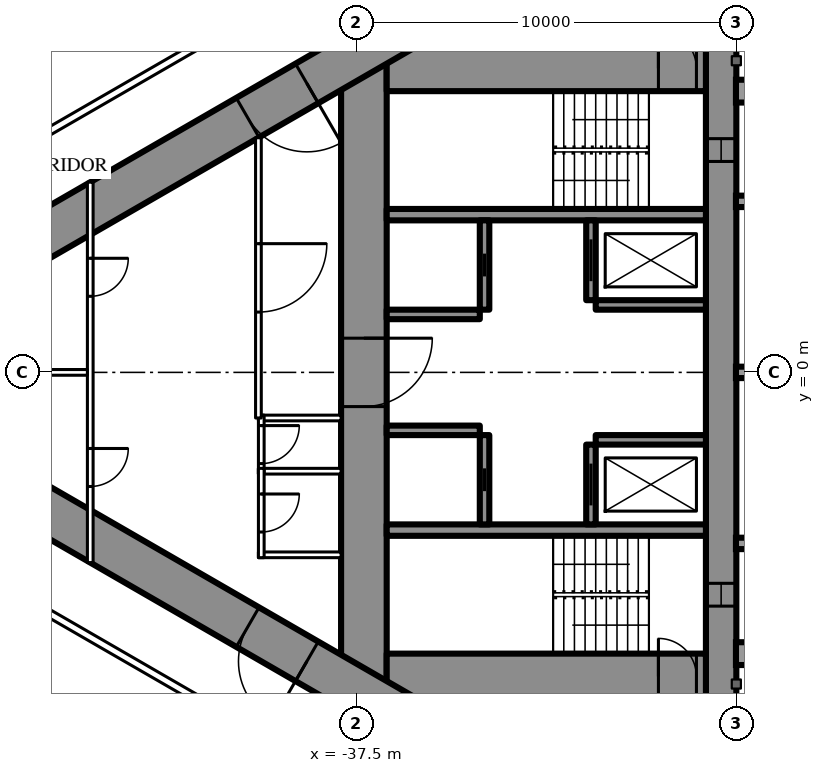
"""IFC4 building model, lengths in metres.
Left out: names, types, materials, properties, quantities, classifications, styles, units other than length and angle.
Written with IfcOpenShell. Run it as: python <this file> out.ifc"""

import sys

from ifc_helpers import new_model, si_unit, direction, frame, frame_2d, origin, place, context, subcontext, project, spatial, rectangle, extrude, element, fill, save


model = new_model("IFC4")
c1 = context("Model", 3, precision=1e-05, world=origin(), true_north=direction((0.0, 1.0)))
c2 = subcontext(c1, "Body", "Model", "MODEL_VIEW")
j1 = project(units=[si_unit("LENGTHUNIT", "METRE"), si_unit("PLANEANGLEUNIT", "RADIAN")], contexts=[c1])
p1 = place(None, origin())
s1 = spatial("IfcSite", under=j1, at=p1, CompositionType="ELEMENT")
p2 = place(p1, origin())
s2 = spatial("IfcBuilding", under=s1, at=p2, CompositionType="ELEMENT")
p3 = place(p2, frame((0.0, 0.0, 90.6)))
s3 = spatial("IfcBuildingStorey", under=s2, at=p3, CompositionType="ELEMENT", Elevation=90.6)
p4 = place(p3, frame((-27.9, 8.6, 0.0), z_axis=(0.0, 0.0, 1.0), x_axis=(0.0, -1.0, 0.0)))
e1 = element("IfcWall", 1, at=p4, inside=s3, PredefinedType="SHEAR", context=c2, shape_type="SweptSolid", body=[
    extrude(rectangle(XDim=17.2, YDim=0.8, at=frame_2d((8.6, 0.0))), origin(), (0.0, 0.0, 1.0), 3.5),
])
p5 = place(p4, frame((2.45, 0.0, 0.6)))
e2 = element("IfcOpeningElement", 2, at=p5, cuts=e1, PredefinedType="OPENING", context=c2, shape_type="SweptSolid", body=[
    extrude(rectangle(XDim=0.6, YDim=2.1, at=frame_2d((0.3, 1.05))), frame((0.0, 0.41, 0.0), z_axis=(0.0, -1.0, 0.0), x_axis=(1.0, 0.0, 0.0)), (0.0, 0.0, 1.0), 0.82),
])
p6 = place(p4, frame((14.15, 0.0, 0.6)))
e3 = element("IfcOpeningElement", 3, at=p6, cuts=e1, PredefinedType="OPENING", context=c2, shape_type="SweptSolid", body=[
    extrude(rectangle(XDim=0.6, YDim=2.1, at=frame_2d((0.3, 1.05))), frame((0.0, 0.41, 0.0), z_axis=(0.0, -1.0, 0.0), x_axis=(1.0, 0.0, 0.0)), (0.0, 0.0, 1.0), 0.82),
])
p7 = place(p3, frame((-37.3, 8.6, 0.0), z_axis=(0.0, 0.0, 1.0), x_axis=(0.0, -1.0, 0.0)))
e4 = element("IfcWall", 4, at=p7, inside=s3, PredefinedType="SHEAR", context=c2, shape_type="SweptSolid", body=[
    extrude(rectangle(XDim=17.2, YDim=1.2, at=frame_2d((8.6, 0.0))), origin(), (0.0, 0.0, 1.0), 3.5),
])
p8 = place(p7, frame((7.7, 0.0, 0.0)))
e5 = element("IfcOpeningElement", 5, at=p8, cuts=e4, PredefinedType="OPENING", context=c2, shape_type="SweptSolid", body=[
    extrude(rectangle(XDim=1.8, YDim=2.2, at=frame_2d((0.9, 1.1))), frame((0.0, 0.61, 0.0), z_axis=(0.0, -1.0, 0.0), x_axis=(1.0, 0.0, 0.0)), (0.0, 0.0, 1.0), 1.22),
])
p9 = place(p3, frame((-28.3, 8.0, 0.0), z_axis=(0.0, 0.0, 1.0), x_axis=(-1.0, 0.0, 0.0)))
e6 = element("IfcWall", 6, at=p9, inside=s3, PredefinedType="SHEAR", context=c2, shape_type="SweptSolid", body=[
    extrude(rectangle(XDim=8.4, YDim=1.2, at=frame_2d((4.2, 0.0))), origin(), (0.0, 0.0, 1.0), 3.5),
])
p10 = place(p9, frame((0.25, 0.0, 0.0)))
e7 = element("IfcOpeningElement", 7, at=p10, cuts=e6, PredefinedType="OPENING", context=c2, shape_type="SweptSolid", body=[
    extrude(rectangle(XDim=1.0, YDim=2.2, at=frame_2d((0.5, 1.1))), frame((0.0, 0.61, 0.0), z_axis=(0.0, -1.0, 0.0), x_axis=(1.0, 0.0, 0.0)), (0.0, 0.0, 1.0), 1.22),
])
p11 = place(p3, frame((-28.3, -8.0, 0.0), z_axis=(0.0, 0.0, 1.0), x_axis=(-1.0, 0.0, 0.0)))
e8 = element("IfcWall", 8, at=p11, inside=s3, PredefinedType="SHEAR", context=c2, shape_type="SweptSolid", body=[
    extrude(rectangle(XDim=8.4, YDim=1.2, at=frame_2d((4.2, 0.0))), origin(), (0.0, 0.0, 1.0), 3.5),
])
p12 = place(p11, frame((0.25, 0.0, 0.0)))
e9 = element("IfcOpeningElement", 9, at=p12, cuts=e8, PredefinedType="OPENING", context=c2, shape_type="SweptSolid", body=[
    extrude(rectangle(XDim=1.0, YDim=2.2, at=frame_2d((0.5, 1.1))), frame((0.0, 0.61, 0.0), z_axis=(0.0, -1.0, 0.0), x_axis=(1.0, 0.0, 0.0)), (0.0, 0.0, 1.0), 1.22),
])
for number, where, z_axis, x_axis in (
    (10, (-28.3, 4.15, 0.0), (0.0, 0.0, 1.0), (-1.0, 0.0, 0.0)),
    (11, (-28.3, -4.15, 0.0), (0.0, 0.0, 1.0), (-1.0, 0.0, 0.0)),
):
    element("IfcWall", number, at=place(p3, frame(where, z_axis=z_axis, x_axis=x_axis)), inside=s3, PredefinedType="SHEAR", context=c2, shape_type="SweptSolid", body=[
        extrude(rectangle(XDim=8.4, YDim=0.3, at=frame_2d((4.2, 0.0))), origin(), (0.0, 0.0, 1.0), 3.5),
    ])
p13 = place(p3, frame((-31.325, 4.0, 0.0), z_axis=(0.0, 0.0, 1.0), x_axis=(0.0, -1.0, 0.0)))
e12 = element("IfcWall", 12, at=p13, inside=s3, PredefinedType="SHEAR", context=c2, shape_type="SweptSolid", body=[
    extrude(rectangle(XDim=2.1, YDim=0.25, at=frame_2d((1.05, 0.0))), origin(), (0.0, 0.0, 1.0), 3.5),
])
p14 = place(p13, frame((0.5, 0.0, 0.0)))
e13 = element("IfcOpeningElement", 13, at=p14, cuts=e12, PredefinedType="OPENING", context=c2, shape_type="SweptSolid", body=[
    extrude(rectangle(XDim=1.1, YDim=2.2, at=frame_2d((0.55, 1.1))), frame((0.0, 0.135, 0.0), z_axis=(0.0, -1.0, 0.0), x_axis=(1.0, 0.0, 0.0)), (0.0, 0.0, 1.0), 0.27),
])
p15 = place(p3, frame((-34.125, 4.0, 0.0), z_axis=(0.0, 0.0, 1.0), x_axis=(0.0, -1.0, 0.0)))
e14 = element("IfcWall", 14, at=p15, inside=s3, PredefinedType="SHEAR", context=c2, shape_type="SweptSolid", body=[
    extrude(rectangle(XDim=2.35, YDim=0.25, at=frame_2d((1.175, 0.0))), origin(), (0.0, 0.0, 1.0), 3.5),
])
p16 = place(p15, frame((0.875, 0.0, 0.0)))
e15 = element("IfcOpeningElement", 15, at=p16, cuts=e14, PredefinedType="OPENING", context=c2, shape_type="SweptSolid", body=[
    extrude(rectangle(XDim=0.6, YDim=2.0, at=frame_2d((0.3, 1.0))), frame((0.0, 0.135, 0.0), z_axis=(0.0, -1.0, 0.0), x_axis=(1.0, 0.0, 0.0)), (0.0, 0.0, 1.0), 0.27),
])
p17 = place(p3, frame((-28.3, 1.775, 0.0), z_axis=(0.0, 0.0, 1.0), x_axis=(-1.0, 0.0, 0.0)))
e16 = element("IfcWall", 16, at=p17, inside=s3, PredefinedType="SHEAR", context=c2, shape_type="SweptSolid", body=[
    extrude(rectangle(XDim=2.9, YDim=0.25, at=frame_2d((1.45, 0.0))), origin(), (0.0, 0.0, 1.0), 3.5),
])
p18 = place(p3, frame((-34.25, 1.525, 0.0), z_axis=(0.0, 0.0, 1.0), x_axis=(-1.0, 0.0, 0.0)))
e17 = element("IfcWall", 17, at=p18, inside=s3, PredefinedType="SHEAR", context=c2, shape_type="SweptSolid", body=[
    extrude(rectangle(XDim=2.45, YDim=0.25, at=frame_2d((1.225, 0.0))), origin(), (0.0, 0.0, 1.0), 3.5),
])
p19 = place(p3, frame((-31.325, -1.9, 0.0), z_axis=(0.0, 0.0, 1.0), x_axis=(0.0, -1.0, 0.0)))
e18 = element("IfcWall", 18, at=p19, inside=s3, PredefinedType="SHEAR", context=c2, shape_type="SweptSolid", body=[
    extrude(rectangle(XDim=2.1, YDim=0.25, at=frame_2d((1.05, 0.0))), origin(), (0.0, 0.0, 1.0), 3.5),
])
p20 = place(p19, frame((0.5, 0.0, 0.0)))
e19 = element("IfcOpeningElement", 19, at=p20, cuts=e18, PredefinedType="OPENING", context=c2, shape_type="SweptSolid", body=[
    extrude(rectangle(XDim=1.1, YDim=2.2, at=frame_2d((0.55, 1.1))), frame((0.0, 0.135, 0.0), z_axis=(0.0, -1.0, 0.0), x_axis=(1.0, 0.0, 0.0)), (0.0, 0.0, 1.0), 0.27),
])
p21 = place(p3, frame((-34.125, -1.65, 0.0), z_axis=(0.0, 0.0, 1.0), x_axis=(0.0, -1.0, 0.0)))
e20 = element("IfcWall", 20, at=p21, inside=s3, PredefinedType="SHEAR", context=c2, shape_type="SweptSolid", body=[
    extrude(rectangle(XDim=2.35, YDim=0.25, at=frame_2d((1.175, 0.0))), origin(), (0.0, 0.0, 1.0), 3.5),
])
p22 = place(p21, frame((0.875, 0.0, 0.0)))
e21 = element("IfcOpeningElement", 21, at=p22, cuts=e20, PredefinedType="OPENING", context=c2, shape_type="SweptSolid", body=[
    extrude(rectangle(XDim=0.6, YDim=2.0, at=frame_2d((0.3, 1.0))), frame((0.0, 0.135, 0.0), z_axis=(0.0, -1.0, 0.0), x_axis=(1.0, 0.0, 0.0)), (0.0, 0.0, 1.0), 0.27),
])
p23 = place(p3, frame((-28.3, -1.775, 0.0), z_axis=(0.0, 0.0, 1.0), x_axis=(-1.0, 0.0, 0.0)))
e22 = element("IfcWall", 22, at=p23, inside=s3, PredefinedType="SHEAR", context=c2, shape_type="SweptSolid", body=[
    extrude(rectangle(XDim=2.9, YDim=0.25, at=frame_2d((1.45, 0.0))), origin(), (0.0, 0.0, 1.0), 3.5),
])
p24 = place(p3, frame((-34.25, -1.525, 0.0), z_axis=(0.0, 0.0, 1.0), x_axis=(-1.0, 0.0, 0.0)))
e23 = element("IfcWall", 23, at=p24, inside=s3, PredefinedType="SHEAR", context=c2, shape_type="SweptSolid", body=[
    extrude(rectangle(XDim=2.45, YDim=0.25, at=frame_2d((1.225, 0.0))), origin(), (0.0, 0.0, 1.0), 3.5),
])
p25 = place(p3, frame((-27.2, 14.3, 0.0), z_axis=(0.0, 0.0, 1.0), x_axis=(-0.866026593062, -0.499997940104, 0.0)))
e24 = element("IfcWall", 24, at=p25, inside=s3, PredefinedType="SHEAR", context=c2, shape_type="SweptSolid", body=[
    extrude(rectangle(XDim=28.946, YDim=1.2, at=frame_2d((14.473, 0.0))), origin(), (0.0, 0.0, 1.0), 3.5),
])
p26 = place(p25, frame((4.6, 0.0, 0.0)))
e25 = element("IfcOpeningElement", 25, at=p26, cuts=e24, PredefinedType="OPENING", context=c2, shape_type="SweptSolid", body=[
    extrude(rectangle(XDim=1.0, YDim=2.2, at=frame_2d((0.5, 1.1))), frame((0.0, 0.61, 0.0), z_axis=(0.0, -1.0, 0.0), x_axis=(1.0, 0.0, 0.0)), (0.0, 0.0, 1.0), 1.22),
])
p27 = place(p25, frame((13.395, 0.0, 0.0)))
e26 = element("IfcOpeningElement", 26, at=p27, cuts=e24, PredefinedType="OPENING", context=c2, shape_type="SweptSolid", body=[
    extrude(rectangle(XDim=1.8, YDim=2.2, at=frame_2d((0.9, 1.1))), frame((0.0, 0.61, 0.0), z_axis=(0.0, -1.0, 0.0), x_axis=(1.0, 0.0, 0.0)), (0.0, 0.0, 1.0), 1.22),
])
p28 = place(p3, frame((-27.2, -14.3, 0.0), z_axis=(0.0, 0.0, 1.0), x_axis=(-0.866024021859, 0.500002393557, 0.0)))
e27 = element("IfcWall", 27, at=p28, inside=s3, PredefinedType="SHEAR", context=c2, shape_type="SweptSolid", body=[
    extrude(rectangle(XDim=27.907, YDim=1.2, at=frame_2d((13.954, 0.0))), origin(), (0.0, 0.0, 1.0), 3.5),
])
p29 = place(p28, frame((4.6, 0.0, 0.0)))
e28 = element("IfcOpeningElement", 28, at=p29, cuts=e27, PredefinedType="OPENING", context=c2, shape_type="SweptSolid", body=[
    extrude(rectangle(XDim=1.0, YDim=2.2, at=frame_2d((0.5, 1.1))), frame((0.0, 0.61, 0.0), z_axis=(0.0, -1.0, 0.0), x_axis=(1.0, 0.0, 0.0)), (0.0, 0.0, 1.0), 1.22),
])
p30 = place(p28, frame((13.395, 0.0, 0.0)))
e29 = element("IfcOpeningElement", 29, at=p30, cuts=e27, PredefinedType="OPENING", context=c2, shape_type="SweptSolid", body=[
    extrude(rectangle(XDim=1.8, YDim=2.2, at=frame_2d((0.9, 1.1))), frame((0.0, 0.61, 0.0), z_axis=(0.0, -1.0, 0.0), x_axis=(1.0, 0.0, 0.0)), (0.0, 0.0, 1.0), 1.22),
])
p31 = place(p3, frame((-37.7, 10.894, 0.0), z_axis=(0.0, 0.0, 1.0), x_axis=(-0.866027905338, -0.499995667157, 0.0)))
e30 = element("IfcWall", 30, at=p31, inside=s3, PredefinedType="PARTITIONING", context=c2, shape_type="SweptSolid", body=[
    extrude(rectangle(XDim=21.787, YDim=0.2, at=frame_2d((10.894, 0.0))), origin(), (0.0, 0.0, 1.0), 3.25),
])
p32 = place(p31, frame((17.887, 0.0, 0.0)))
e31 = element("IfcOpeningElement", 31, at=p32, cuts=e30, PredefinedType="OPENING", context=c2, shape_type="SweptSolid", body=[
    extrude(rectangle(XDim=0.95, YDim=2.2, at=frame_2d((0.475, 1.1))), frame((0.0, 0.11, 0.0), z_axis=(0.0, -1.0, 0.0), x_axis=(1.0, 0.0, 0.0)), (0.0, 0.0, 1.0), 0.22),
])
p33 = place(p31, frame((9.531, 0.0, 0.0)))
e32 = element("IfcOpeningElement", 32, at=p33, cuts=e30, PredefinedType="OPENING", context=c2, shape_type="SweptSolid", body=[
    extrude(rectangle(XDim=0.95, YDim=2.2, at=frame_2d((0.475, 1.1))), frame((0.0, 0.11, 0.0), z_axis=(0.0, -1.0, 0.0), x_axis=(1.0, 0.0, 0.0)), (0.0, 0.0, 1.0), 0.22),
])
p34 = place(p3, frame((-36.92, -11.344, 0.0), z_axis=(0.0, 0.0, 1.0), x_axis=(-0.866028313256, 0.499994960614, 0.0)))
e33 = element("IfcWall", 33, at=p34, inside=s3, PredefinedType="PARTITIONING", context=c2, shape_type="SweptSolid", body=[
    extrude(rectangle(XDim=22.568, YDim=0.2, at=frame_2d((11.284, 0.0))), origin(), (0.0, 0.0, 1.0), 3.25),
])
p35 = place(p34, frame((14.481, 0.0, 0.0)))
e34 = element("IfcOpeningElement", 34, at=p35, cuts=e33, PredefinedType="OPENING", context=c2, shape_type="SweptSolid", body=[
    extrude(rectangle(XDim=0.95, YDim=2.2, at=frame_2d((0.475, 1.1))), frame((0.0, 0.11, 0.0), z_axis=(0.0, -1.0, 0.0), x_axis=(1.0, 0.0, 0.0)), (0.0, 0.0, 1.0), 0.22),
])
p36 = place(p34, frame((3.35, 0.0, 0.0)))
e35 = element("IfcOpeningElement", 35, at=p36, cuts=e33, PredefinedType="OPENING", context=c2, shape_type="SweptSolid", body=[
    extrude(rectangle(XDim=1.0, YDim=2.2, at=frame_2d((0.5, 1.1))), frame((0.0, 0.11, 0.0), z_axis=(0.0, -1.0, 0.0), x_axis=(1.0, 0.0, 0.0)), (0.0, 0.0, 1.0), 0.22),
])
for number, where, z_axis, x_axis in (
    (36, (-37.9, -1.2, 0.0), (0.0, 0.0, 1.0), (-1.0, 0.0, 0.0)),
    (37, (-37.9, -2.6, 0.0), (0.0, 0.0, 1.0), (-1.0, 0.0, 0.0)),
    (38, (-37.9, -4.8, 0.0), (0.0, 0.0, 1.0), (-1.0, 0.0, 0.0)),
):
    element("IfcWall", number, at=place(p3, frame(where, z_axis=z_axis, x_axis=x_axis)), inside=s3, PredefinedType="PARTITIONING", context=c2, shape_type="SweptSolid", body=[
        extrude(rectangle(XDim=2.175, YDim=0.15, at=frame_2d((1.087, 0.0))), origin(), (0.0, 0.0, 1.0), 3.25),
    ])
p37 = place(p3, frame((-40.0, -1.125, 0.0), z_axis=(0.0, 0.0, 1.0), x_axis=(0.0, -1.0, 0.0)))
e39 = element("IfcWall", 39, at=p37, inside=s3, PredefinedType="PARTITIONING", context=c2, shape_type="SweptSolid", body=[
    extrude(rectangle(XDim=1.55, YDim=0.15, at=frame_2d((0.775, 0.0))), origin(), (0.0, 0.0, 1.0), 3.25),
])
p38 = place(p37, frame((0.275, 0.0, 0.0)))
e40 = element("IfcOpeningElement", 40, at=p38, cuts=e39, PredefinedType="OPENING", context=c2, shape_type="SweptSolid", body=[
    extrude(rectangle(XDim=1.0, YDim=2.2, at=frame_2d((0.5, 1.1))), frame((0.0, 0.085, 0.0), z_axis=(0.0, -1.0, 0.0), x_axis=(1.0, 0.0, 0.0)), (0.0, 0.0, 1.0), 0.17),
])
p39 = place(p3, frame((-40.0, -2.525, 0.0), z_axis=(0.0, 0.0, 1.0), x_axis=(0.0, -1.0, 0.0)))
e41 = element("IfcWall", 41, at=p39, inside=s3, PredefinedType="PARTITIONING", context=c2, shape_type="SweptSolid", body=[
    extrude(rectangle(XDim=2.35, YDim=0.15, at=frame_2d((1.175, 0.0))), origin(), (0.0, 0.0, 1.0), 3.25),
])
p40 = place(p39, frame((0.675, 0.0, 0.0)))
e42 = element("IfcOpeningElement", 42, at=p40, cuts=e41, PredefinedType="OPENING", context=c2, shape_type="SweptSolid", body=[
    extrude(rectangle(XDim=1.0, YDim=2.2, at=frame_2d((0.5, 1.1))), frame((0.0, 0.085, 0.0), z_axis=(0.0, -1.0, 0.0), x_axis=(1.0, 0.0, 0.0)), (0.0, 0.0, 1.0), 0.17),
])
p41 = place(p3, frame((-40.075, 6.174, 0.0), z_axis=(0.0, 0.0, 1.0), x_axis=(0.0, -1.0, 0.0)))
e43 = element("IfcWall", 43, at=p41, inside=s3, PredefinedType="PARTITIONING", context=c2, shape_type="SweptSolid", body=[
    extrude(rectangle(XDim=7.374, YDim=0.15, at=frame_2d((3.687, 0.0))), origin(), (0.0, 0.0, 1.0), 3.25),
])
p42 = place(p41, frame((2.787, 0.0, 0.0)))
e44 = element("IfcOpeningElement", 44, at=p42, cuts=e43, PredefinedType="OPENING", context=c2, shape_type="SweptSolid", body=[
    extrude(rectangle(XDim=1.8, YDim=2.2, at=frame_2d((0.9, 1.1))), frame((0.0, 0.085, 0.0), z_axis=(0.0, -1.0, 0.0), x_axis=(1.0, 0.0, 0.0)), (0.0, 0.0, 1.0), 0.17),
])
p43 = place(p3, frame((-44.5, 5.005, 0.0), z_axis=(0.0, 0.0, 1.0), x_axis=(0.0, -1.0, 0.0)))
e45 = element("IfcWall", 45, at=p43, inside=s3, PredefinedType="PARTITIONING", context=c2, shape_type="SweptSolid", body=[
    extrude(rectangle(XDim=10.009, YDim=0.15, at=frame_2d((5.005, 0.0))), origin(), (0.0, 0.0, 1.0), 2.45),
])
p44 = place(p43, frame((2.002, 0.0, 0.0)))
e46 = element("IfcOpeningElement", 46, at=p44, cuts=e45, PredefinedType="OPENING", context=c2, shape_type="SweptSolid", body=[
    extrude(rectangle(XDim=1.0, YDim=2.2, at=frame_2d((0.5, 1.1))), frame((0.0, 0.085, 0.0), z_axis=(0.0, -1.0, 0.0), x_axis=(1.0, 0.0, 0.0)), (0.0, 0.0, 1.0), 0.17),
])
p45 = place(p43, frame((7.007, 0.0, 0.0)))
e47 = element("IfcOpeningElement", 47, at=p45, cuts=e45, PredefinedType="OPENING", context=c2, shape_type="SweptSolid", body=[
    extrude(rectangle(XDim=1.0, YDim=2.2, at=frame_2d((0.5, 1.1))), frame((0.0, 0.085, 0.0), z_axis=(0.0, -1.0, 0.0), x_axis=(1.0, 0.0, 0.0)), (0.0, 0.0, 1.0), 0.17),
])
p46 = place(p3, frame((-44.575, 0.0, 0.0), z_axis=(0.0, 0.0, 1.0), x_axis=(-1.0, 0.0, 0.0)))
e48 = element("IfcWall", 48, at=p46, inside=s3, PredefinedType="PARTITIONING", context=c2, shape_type="SweptSolid", body=[
    extrude(rectangle(XDim=8.593, YDim=0.15, at=frame_2d((4.297, 0.0))), origin(), (0.0, 0.0, 1.0), 2.2),
])
p47 = place(p38, origin())
e49 = element("IfcDoor", 49, at=p47, inside=s3, OperationType="SINGLE_SWING_LEFT", PredefinedType="DOOR", context=c2, shape_type="SweptSolid", body=[
    extrude(rectangle(XDim=1.0, YDim=2.2, at=frame_2d((0.5, 1.1))), frame((0.0, 0.025, 0.0), z_axis=(0.0, -1.0, 0.0), x_axis=(1.0, 0.0, 0.0)), (0.0, 0.0, 1.0), 0.05),
])
fill(e40, e49)
p48 = place(p40, origin())
e50 = element("IfcDoor", 50, at=p48, inside=s3, OperationType="SINGLE_SWING_LEFT", PredefinedType="DOOR", context=c2, shape_type="SweptSolid", body=[
    extrude(rectangle(XDim=1.0, YDim=2.2, at=frame_2d((0.5, 1.1))), frame((0.0, 0.025, 0.0), z_axis=(0.0, -1.0, 0.0), x_axis=(1.0, 0.0, 0.0)), (0.0, 0.0, 1.0), 0.05),
])
fill(e42, e50)
p49 = place(p42, origin())
e51 = element("IfcDoor", 51, at=p49, inside=s3, OperationType="DOUBLE_DOOR_SINGLE_SWING", PredefinedType="DOOR", context=c2, shape_type="SweptSolid", body=[
    extrude(rectangle(XDim=1.8, YDim=2.2, at=frame_2d((0.9, 1.1))), frame((0.0, 0.025, 0.0), z_axis=(0.0, -1.0, 0.0), x_axis=(1.0, 0.0, 0.0)), (0.0, 0.0, 1.0), 0.05),
])
fill(e44, e51)
p50 = place(p44, origin())
e52 = element("IfcDoor", 52, at=p50, inside=s3, OperationType="SINGLE_SWING_LEFT", PredefinedType="DOOR", context=c2, shape_type="SweptSolid", body=[
    extrude(rectangle(XDim=1.0, YDim=2.2, at=frame_2d((0.5, 1.1))), frame((0.0, 0.025, 0.0), z_axis=(0.0, -1.0, 0.0), x_axis=(1.0, 0.0, 0.0)), (0.0, 0.0, 1.0), 0.05),
])
fill(e46, e52)
p51 = place(p45, origin())
e53 = element("IfcDoor", 53, at=p51, inside=s3, OperationType="SINGLE_SWING_LEFT", PredefinedType="DOOR", context=c2, shape_type="SweptSolid", body=[
    extrude(rectangle(XDim=1.0, YDim=2.2, at=frame_2d((0.5, 1.1))), frame((0.0, 0.025, 0.0), z_axis=(0.0, -1.0, 0.0), x_axis=(1.0, 0.0, 0.0)), (0.0, 0.0, 1.0), 0.05),
])
fill(e47, e53)
p52 = place(p27, origin())
e54 = element("IfcDoor", 54, at=p52, inside=s3, OperationType="DOUBLE_DOOR_SINGLE_SWING", PredefinedType="DOOR", context=c2, shape_type="SweptSolid", body=[
    extrude(rectangle(XDim=1.8, YDim=2.2, at=frame_2d((0.9, 1.1))), frame((0.0, 0.025, 0.0), z_axis=(0.0, -1.0, 0.0), x_axis=(1.0, 0.0, 0.0)), (0.0, 0.0, 1.0), 0.05),
])
fill(e26, e54)
p53 = place(p30, origin())
e55 = element("IfcDoor", 55, at=p53, inside=s3, OperationType="DOUBLE_DOOR_SINGLE_SWING", PredefinedType="DOOR", context=c2, shape_type="SweptSolid", body=[
    extrude(rectangle(XDim=1.8, YDim=2.2, at=frame_2d((0.9, 1.1))), frame((0.0, 0.025, 0.0), z_axis=(0.0, -1.0, 0.0), x_axis=(1.0, 0.0, 0.0)), (0.0, 0.0, 1.0), 0.05),
])
fill(e29, e55)
p54 = place(p8, origin())
e56 = element("IfcDoor", 56, at=p54, inside=s3, OperationType="DOUBLE_DOOR_SINGLE_SWING", PredefinedType="DOOR", context=c2, shape_type="SweptSolid", body=[
    extrude(rectangle(XDim=1.8, YDim=2.2, at=frame_2d((0.9, 1.1))), frame((0.0, 0.025, 0.0), z_axis=(0.0, -1.0, 0.0), x_axis=(1.0, 0.0, 0.0)), (0.0, 0.0, 1.0), 0.05),
])
fill(e5, e56)
p55 = place(p10, origin())
e57 = element("IfcDoor", 57, at=p55, inside=s3, OperationType="SINGLE_SWING_RIGHT", PredefinedType="DOOR", context=c2, shape_type="SweptSolid", body=[
    extrude(rectangle(XDim=1.0, YDim=2.2, at=frame_2d((0.5, 1.1))), frame((0.0, 0.025, 0.0), z_axis=(0.0, -1.0, 0.0), x_axis=(1.0, 0.0, 0.0)), (0.0, 0.0, 1.0), 0.05),
])
fill(e7, e57)
p56 = place(p12, origin())
e58 = element("IfcDoor", 58, at=p56, inside=s3, OperationType="SINGLE_SWING_RIGHT", PredefinedType="DOOR", context=c2, shape_type="SweptSolid", body=[
    extrude(rectangle(XDim=1.0, YDim=2.2, at=frame_2d((0.5, 1.1))), frame((0.0, 0.025, 0.0), z_axis=(0.0, -1.0, 0.0), x_axis=(1.0, 0.0, 0.0)), (0.0, 0.0, 1.0), 0.05),
])
fill(e9, e58)
p57 = place(p14, origin())
e59 = element("IfcDoor", 59, at=p57, inside=s3, OperationType="SLIDING_TO_LEFT", PredefinedType="USERDEFINED", context=c2, shape_type="SweptSolid", body=[
    extrude(rectangle(XDim=1.1, YDim=2.2, at=frame_2d((0.55, 1.1))), frame((0.0, 0.025, 0.0), z_axis=(0.0, -1.0, 0.0), x_axis=(1.0, 0.0, 0.0)), (0.0, 0.0, 1.0), 0.05),
])
fill(e13, e59)
p58 = place(p20, origin())
e60 = element("IfcDoor", 60, at=p58, inside=s3, OperationType="SLIDING_TO_LEFT", PredefinedType="USERDEFINED", context=c2, shape_type="SweptSolid", body=[
    extrude(rectangle(XDim=1.1, YDim=2.2, at=frame_2d((0.55, 1.1))), frame((0.0, 0.025, 0.0), z_axis=(0.0, -1.0, 0.0), x_axis=(1.0, 0.0, 0.0)), (0.0, 0.0, 1.0), 0.05),
])
fill(e19, e60)
p59 = place(p16, origin())
e61 = element("IfcDoor", 61, at=p59, inside=s3, OperationType="SLIDING_TO_LEFT", PredefinedType="DOOR", context=c2, shape_type="SweptSolid", body=[
    extrude(rectangle(XDim=0.6, YDim=2.0, at=frame_2d((0.3, 1.0))), frame((0.0, 0.025, 0.0), z_axis=(0.0, -1.0, 0.0), x_axis=(1.0, 0.0, 0.0)), (0.0, 0.0, 1.0), 0.05),
])
fill(e15, e61)
p60 = place(p22, origin())
e62 = element("IfcDoor", 62, at=p60, inside=s3, OperationType="SLIDING_TO_LEFT", PredefinedType="DOOR", context=c2, shape_type="SweptSolid", body=[
    extrude(rectangle(XDim=0.6, YDim=2.0, at=frame_2d((0.3, 1.0))), frame((0.0, 0.025, 0.0), z_axis=(0.0, -1.0, 0.0), x_axis=(1.0, 0.0, 0.0)), (0.0, 0.0, 1.0), 0.05),
])
fill(e21, e62)
p61 = place(p5, origin())
e63 = element("IfcWindow", 63, at=p61, inside=s3, PartitioningType="SINGLE_PANEL", PredefinedType="WINDOW", context=c2, shape_type="SweptSolid", body=[
    extrude(rectangle(XDim=0.6, YDim=2.1, at=frame_2d((0.3, 1.05))), frame((0.0, 0.03, 0.0), z_axis=(0.0, -1.0, 0.0), x_axis=(1.0, 0.0, 0.0)), (0.0, 0.0, 1.0), 0.06),
])
fill(e2, e63)
p62 = place(p6, origin())
e64 = element("IfcWindow", 64, at=p62, inside=s3, PartitioningType="SINGLE_PANEL", PredefinedType="WINDOW", context=c2, shape_type="SweptSolid", body=[
    extrude(rectangle(XDim=0.6, YDim=2.1, at=frame_2d((0.3, 1.05))), frame((0.0, 0.03, 0.0), z_axis=(0.0, -1.0, 0.0), x_axis=(1.0, 0.0, 0.0)), (0.0, 0.0, 1.0), 0.06),
])
fill(e3, e64)
save(model, sys.argv[1])
